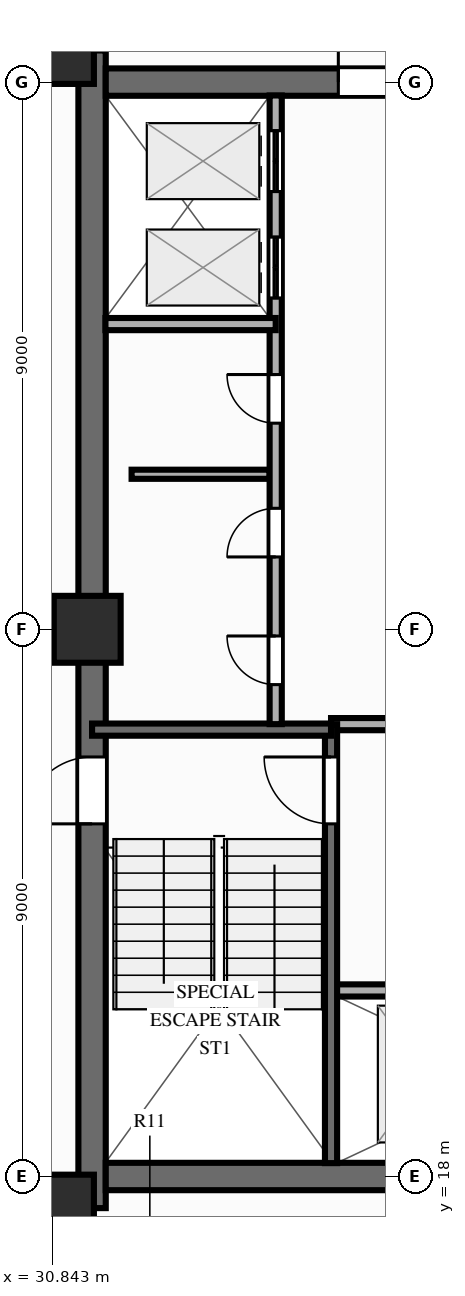
"""IFC4 building model, lengths in metres.
Left out: names, types, materials, properties, quantities, classifications, styles, units other than length and angle.
Written with IfcOpenShell. Run it as: python <this file> out.ifc"""

import sys

from ifc_helpers import new_model, si_unit, direction, frame, frame_2d, origin, origin_2d, place, context, subcontext, project, spatial, rectangle, extrude, source, transform, mapped, element, fill, save


model = new_model("IFC4")
c1 = context("Model", 3, precision=1e-05, world=origin(), true_north=direction((0.0, 1.0)))
c2 = subcontext(c1, "Body", "Model", "MODEL_VIEW")
j1 = project(units=[si_unit("LENGTHUNIT", "METRE"), si_unit("PLANEANGLEUNIT", "RADIAN")], contexts=[c1])
p1 = place(None, origin())
s1 = spatial("IfcSite", under=j1, at=p1, CompositionType="ELEMENT")
p2 = place(p1, origin())
s2 = spatial("IfcBuilding", under=s1, at=p2, CompositionType="ELEMENT")
p3 = place(p2, frame((0.0, 0.0, 182.8)))
s3 = spatial("IfcBuildingStorey", under=s2, at=p3, CompositionType="ELEMENT", Elevation=182.8)
p4 = place(p3, frame((31.5, 17.48, 0.0), z_axis=(0.0, 0.0, 1.0), x_axis=(0.0, 1.0, 0.0)))
e1 = element("IfcWall", 1, at=p4, inside=s3, PredefinedType="SHEAR", context=c2, shape_type="SweptSolid", body=[
    extrude(rectangle(XDim=19.04, YDim=0.45, at=frame_2d((9.52, 0.0))), origin(), (0.0, 0.0, 1.0), 3.9),
])
p5 = place(p4, frame((6.32, 0.0, 0.0)))
e2 = element("IfcOpeningElement", 2, at=p5, cuts=e1, PredefinedType="OPENING", context=c2, shape_type="SweptSolid", body=[
    extrude(rectangle(XDim=1.1, YDim=2.15, at=frame_2d((0.55, 1.075))), frame((0.0, 0.237, 0.0), z_axis=(0.0, -1.0, 0.0), x_axis=(1.0, 0.0, 0.0)), (0.0, 0.0, 1.0), 0.474),
])
p6 = place(p3, frame((31.725, 18.0, 0.0), z_axis=(0.0, 0.0, 1.0), x_axis=(1.0, 0.0, 0.0)))
e3 = element("IfcWall", 3, at=p6, inside=s3, PredefinedType="SHEAR", context=c2, shape_type="SweptSolid", body=[
    extrude(rectangle(XDim=12.55, YDim=0.45, at=frame_2d((6.275, 0.0))), origin(), (0.0, 0.0, 1.0), 3.9),
])
p7 = place(p3, frame((31.725, 36.0, 0.0), z_axis=(0.0, 0.0, 1.0), x_axis=(1.0, 0.0, 0.0)))
e4 = element("IfcWall", 4, at=p7, inside=s3, PredefinedType="SHEAR", context=c2, shape_type="SweptSolid", body=[
    extrude(rectangle(XDim=12.55, YDim=0.45, at=frame_2d((6.275, 0.0))), origin(), (0.0, 0.0, 1.0), 3.9),
])
p8 = place(p7, frame((5.225, 0.0, 0.0), z_axis=(0.0, 0.0, 1.0), x_axis=(-1.0, 0.0, 0.0)))
e5 = element("IfcOpeningElement", 5, at=p8, cuts=e4, PredefinedType="OPENING", context=c2, shape_type="SweptSolid", body=[
    extrude(rectangle(XDim=1.4, YDim=2.15, at=frame_2d((0.7, 1.075))), frame((0.0, 0.237, 0.0), z_axis=(0.0, -1.0, 0.0), x_axis=(1.0, 0.0, 0.0)), (0.0, 0.0, 1.0), 0.474),
])
m1 = source(origin(), c2, "Body", "SweptSolid", [
    extrude(rectangle(XDim=1.1, YDim=1.1, at=origin_2d()), origin(), (0.0, 0.0, 1.0), 3.9),
])
for number, where, z_axis, x_axis in (
    (6, (30.98, 17.48, 0.0), (0.0, 0.0, 1.0), (1.0, 0.0, 0.0)),
    (7, (30.98, 36.52, 0.0), (0.0, 0.0, 1.0), (1.0, 0.0, 0.0)),
    (8, (31.42, 27.0, 0.0), (0.0, 0.0, 1.0), (1.0, 0.0, 0.0)),
):
    element("IfcColumn", number, at=place(p3, frame(where, z_axis=z_axis, x_axis=x_axis)), inside=s3, PredefinedType="COLUMN", context=c2, shape_type="MappedRepresentation", body=[
        mapped(m1, transform((0.0, 0.0, 0.0), scale=1.0)),
    ])
p9 = place(p3, frame((32.15, 29.55, 0.0), z_axis=(0.0, 0.0, 1.0), x_axis=(1.0, 0.0, 0.0)))
e9 = element("IfcWall", 9, at=p9, inside=s3, PredefinedType="PARTITIONING", context=c2, shape_type="SweptSolid", body=[
    extrude(rectangle(XDim=2.27, YDim=0.15, at=frame_2d((1.135, 0.0))), origin(), (0.0, 0.0, 1.0), 3.69),
])
p10 = place(p3, frame((35.43, 21.06, 0.0), z_axis=(0.0, 0.0, 1.0), x_axis=(1.0, 0.0, 0.0)))
e10 = element("IfcWall", 10, at=p10, inside=s3, PredefinedType="PARTITIONING", context=c2, shape_type="SweptSolid", body=[
    extrude(rectangle(XDim=6.02, YDim=0.2, at=frame_2d((3.01, 0.0))), origin(), (0.0, 0.0, 1.0), 3.69),
])
p11 = place(p10, frame((1.0, 0.0, 0.0)))
e11 = element("IfcOpeningElement", 11, at=p11, cuts=e10, PredefinedType="OPENING", context=c2, shape_type="SweptSolid", body=[
    extrude(rectangle(XDim=1.1, YDim=2.15, at=frame_2d((0.55, 1.075))), frame((0.0, 0.112, 0.0), z_axis=(0.0, -1.0, 0.0), x_axis=(1.0, 0.0, 0.0)), (0.0, 0.0, 1.0), 0.224),
])
p12 = place(p10, frame((2.95, 0.0, 0.0)))
e12 = element("IfcOpeningElement", 12, at=p12, cuts=e10, PredefinedType="OPENING", context=c2, shape_type="SweptSolid", body=[
    extrude(rectangle(XDim=1.1, YDim=2.15, at=frame_2d((0.55, 1.075))), frame((0.0, 0.112, 0.0), z_axis=(0.0, -1.0, 0.0), x_axis=(1.0, 0.0, 0.0)), (0.0, 0.0, 1.0), 0.224),
])
p13 = place(p10, frame((4.58, 0.0, 0.0)))
e13 = element("IfcOpeningElement", 13, at=p13, cuts=e10, PredefinedType="OPENING", context=c2, shape_type="SweptSolid", body=[
    extrude(rectangle(XDim=1.2, YDim=2.15, at=frame_2d((0.6, 1.075))), frame((0.0, 0.112, 0.0), z_axis=(0.0, -1.0, 0.0), x_axis=(1.0, 0.0, 0.0)), (0.0, 0.0, 1.0), 0.224),
])
p14 = place(p3, frame((35.43, 25.44, 0.0), z_axis=(0.0, 0.0, 1.0), x_axis=(1.0, 0.0, 0.0)))
e14 = element("IfcWall", 14, at=p14, inside=s3, PredefinedType="PARTITIONING", context=c2, shape_type="SweptSolid", body=[
    extrude(rectangle(XDim=4.72, YDim=0.2, at=frame_2d((2.36, 0.0))), origin(), (0.0, 0.0, 1.0), 3.69),
])
p15 = place(p14, frame((1.25, 0.0, 0.0)))
e15 = element("IfcOpeningElement", 15, at=p15, cuts=e14, PredefinedType="OPENING", context=c2, shape_type="SweptSolid", body=[
    extrude(rectangle(XDim=1.1, YDim=2.15, at=frame_2d((0.55, 1.075))), frame((0.0, 0.112, 0.0), z_axis=(0.0, -1.0, 0.0), x_axis=(1.0, 0.0, 0.0)), (0.0, 0.0, 1.0), 0.224),
])
p16 = place(p3, frame((35.43, 18.22, 0.0), z_axis=(0.0, 0.0, 1.0), x_axis=(0.0, 1.0, 0.0)))
e16 = element("IfcWall", 16, at=p16, inside=s3, PredefinedType="SOLIDWALL", context=c2, shape_type="SweptSolid", body=[
    extrude(rectangle(XDim=7.22, YDim=0.2, at=frame_2d((3.61, 0.0))), origin(), (0.0, 0.0, 1.0), 3.69),
])
p17 = place(p16, frame((6.68, 0.0, 0.0), z_axis=(0.0, 0.0, 1.0), x_axis=(-1.0, 0.0, 0.0)))
e17 = element("IfcOpeningElement", 17, at=p17, cuts=e16, PredefinedType="OPENING", context=c2, shape_type="SweptSolid", body=[
    extrude(rectangle(XDim=1.1, YDim=2.15, at=frame_2d((0.55, 1.075))), frame((0.0, 0.112, 0.0), z_axis=(0.0, -1.0, 0.0), x_axis=(1.0, 0.0, 0.0)), (0.0, 0.0, 1.0), 0.224),
])
p18 = place(p3, frame((31.5, 25.35, 0.0), z_axis=(0.0, 0.0, 1.0), x_axis=(1.0, 0.0, 0.0)))
e18 = element("IfcWall", 18, at=p18, inside=s3, PredefinedType="SOLIDWALL", context=c2, shape_type="SweptSolid", body=[
    extrude(rectangle(XDim=3.93, YDim=0.2, at=frame_2d((1.965, 0.0))), origin(), (0.0, 0.0, 1.0), 3.69),
])
p19 = place(p3, frame((34.52, 25.44, 0.0), z_axis=(0.0, 0.0, 1.0), x_axis=(0.0, 1.0, 0.0)))
e19 = element("IfcWall", 19, at=p19, inside=s3, PredefinedType="PARTITIONING", context=c2, shape_type="SweptSolid", body=[
    extrude(rectangle(XDim=10.34, YDim=0.2, at=frame_2d((5.17, 0.0))), origin(), (0.0, 0.0, 1.0), 3.69),
])
p20 = place(p19, frame((0.65, 0.0, 0.0)))
e20 = element("IfcOpeningElement", 20, at=p20, cuts=e19, PredefinedType="OPENING", context=c2, shape_type="SweptSolid", body=[
    extrude(rectangle(XDim=0.8, YDim=2.05, at=frame_2d((0.4, 1.025))), frame((0.0, 0.112, 0.0), z_axis=(0.0, -1.0, 0.0), x_axis=(1.0, 0.0, 0.0)), (0.0, 0.0, 1.0), 0.224),
])
p21 = place(p19, frame((2.75, 0.0, 0.0)))
e21 = element("IfcOpeningElement", 21, at=p21, cuts=e19, PredefinedType="OPENING", context=c2, shape_type="SweptSolid", body=[
    extrude(rectangle(XDim=0.8, YDim=2.05, at=frame_2d((0.4, 1.025))), frame((0.0, 0.112, 0.0), z_axis=(0.0, -1.0, 0.0), x_axis=(1.0, 0.0, 0.0)), (0.0, 0.0, 1.0), 0.224),
])
p22 = place(p19, frame((4.95, 0.0, 0.0)))
e22 = element("IfcOpeningElement", 22, at=p22, cuts=e19, PredefinedType="OPENING", context=c2, shape_type="SweptSolid", body=[
    extrude(rectangle(XDim=0.8, YDim=2.05, at=frame_2d((0.4, 1.025))), frame((0.0, 0.112, 0.0), z_axis=(0.0, -1.0, 0.0), x_axis=(1.0, 0.0, 0.0)), (0.0, 0.0, 1.0), 0.224),
])
p23 = place(p19, frame((7.01, 0.0, 0.0)))
e23 = element("IfcOpeningElement", 23, at=p23, cuts=e19, PredefinedType="OPENING", context=c2, shape_type="SweptSolid", body=[
    extrude(rectangle(XDim=1.0, YDim=2.15, at=frame_2d((0.5, 1.075))), frame((0.0, 0.112, 0.0), z_axis=(0.0, -1.0, 0.0), x_axis=(1.0, 0.0, 0.0)), (0.0, 0.0, 1.0), 0.224),
])
p24 = place(p19, frame((8.76, 0.0, 0.0)))
e24 = element("IfcOpeningElement", 24, at=p24, cuts=e19, PredefinedType="OPENING", context=c2, shape_type="SweptSolid", body=[
    extrude(rectangle(XDim=1.0, YDim=2.15, at=frame_2d((0.5, 1.075))), frame((0.0, 0.112, 0.0), z_axis=(0.0, -1.0, 0.0), x_axis=(1.0, 0.0, 0.0)), (0.0, 0.0, 1.0), 0.224),
])
p25 = place(p3, frame((31.72, 32.02, 0.0), z_axis=(0.0, 0.0, 1.0), x_axis=(1.0, 0.0, 0.0)))
e25 = element("IfcWall", 25, at=p25, inside=s3, PredefinedType="PARTITIONING", context=c2, shape_type="SweptSolid", body=[
    extrude(rectangle(XDim=2.8, YDim=0.2, at=frame_2d((1.4, 0.0))), origin(), (0.0, 0.0, 1.0), 3.69),
])
m2 = source(origin(), c2, "Body", "SweptSolid", [
    extrude(rectangle(XDim=1.1, YDim=2.15, at=frame_2d((0.55, 1.075))), frame((0.0, 0.025, 0.0), z_axis=(0.0, -1.0, 0.0), x_axis=(1.0, 0.0, 0.0)), (0.0, 0.0, 1.0), 0.05),
])
p26 = place(p5, origin())
e26 = element("IfcDoor", 26, at=p26, inside=s3, OperationType="SINGLE_SWING_LEFT", PredefinedType="DOOR", context=c2, shape_type="MappedRepresentation", body=[
    mapped(m2, transform((0.0, 0.0, 0.0), scale=1.0)),
])
fill(e2, e26)
m3 = source(origin(), c2, "Body", "SweptSolid", [
    extrude(rectangle(XDim=1.4, YDim=2.15, at=frame_2d((0.7, 1.075))), frame((0.0, 0.025, 0.0), z_axis=(0.0, -1.0, 0.0), x_axis=(1.0, 0.0, 0.0)), (0.0, 0.0, 1.0), 0.05),
])
p27 = place(p8, origin())
e27 = element("IfcDoor", 27, at=p27, inside=s3, OperationType="SINGLE_SWING_RIGHT", PredefinedType="DOOR", context=c2, shape_type="MappedRepresentation", body=[
    mapped(m3, transform((0.0, 0.0, 0.0), scale=1.0)),
])
fill(e5, e27)
p28 = place(p17, origin())
e28 = element("IfcDoor", 28, at=p28, inside=s3, OperationType="SINGLE_SWING_LEFT", PredefinedType="DOOR", context=c2, shape_type="MappedRepresentation", body=[
    mapped(m2, transform((0.0, 0.0, 0.0), scale=1.0)),
])
fill(e17, e28)
m4 = source(origin(), c2, "Body", "SweptSolid", [
    extrude(rectangle(XDim=0.8, YDim=2.05, at=frame_2d((0.4, 1.025))), frame((0.0, 0.025, 0.0), z_axis=(0.0, -1.0, 0.0), x_axis=(1.0, 0.0, 0.0)), (0.0, 0.0, 1.0), 0.05),
])
p29 = place(p20, origin())
e29 = element("IfcDoor", 29, at=p29, inside=s3, OperationType="SINGLE_SWING_RIGHT", PredefinedType="DOOR", context=c2, shape_type="MappedRepresentation", body=[
    mapped(m4, transform((0.0, 0.0, 0.0), scale=1.0)),
])
fill(e20, e29)
p30 = place(p21, origin())
e30 = element("IfcDoor", 30, at=p30, inside=s3, OperationType="SINGLE_SWING_LEFT", PredefinedType="DOOR", context=c2, shape_type="MappedRepresentation", body=[
    mapped(m4, transform((0.0, 0.0, 0.0), scale=1.0)),
])
fill(e21, e30)
p31 = place(p22, origin())
e31 = element("IfcDoor", 31, at=p31, inside=s3, OperationType="SINGLE_SWING_RIGHT", PredefinedType="DOOR", context=c2, shape_type="MappedRepresentation", body=[
    mapped(m4, transform((0.0, 0.0, 0.0), scale=1.0)),
])
fill(e22, e31)
m5 = source(origin(), c2, "Body", "SweptSolid", [
    extrude(rectangle(XDim=1.0, YDim=2.15, at=frame_2d((0.5, 1.075))), frame((0.0, 0.025, 0.0), z_axis=(0.0, -1.0, 0.0), x_axis=(1.0, 0.0, 0.0)), (0.0, 0.0, 1.0), 0.05),
])
p32 = place(p23, origin())
e32 = element("IfcDoor", 32, at=p32, inside=s3, OperationType="DOUBLE_DOOR_SLIDING", PredefinedType="DOOR", context=c2, shape_type="MappedRepresentation", body=[
    mapped(m5, transform((0.0, 0.0, 0.0), scale=1.0)),
])
fill(e23, e32)
p33 = place(p24, origin())
e33 = element("IfcDoor", 33, at=p33, inside=s3, OperationType="DOUBLE_DOOR_SLIDING", PredefinedType="DOOR", context=c2, shape_type="MappedRepresentation", body=[
    mapped(m5, transform((0.0, 0.0, 0.0), scale=1.0)),
])
fill(e24, e33)
save(model, sys.argv[1])
